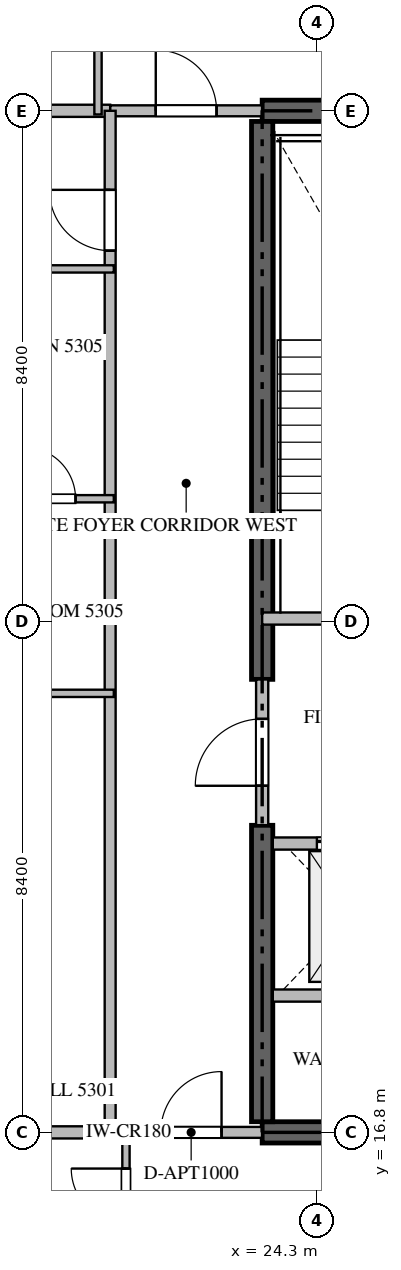
"""IFC4 building model, lengths in metres.
Left out: names, types, materials, properties, quantities, classifications, styles, units other than length and angle.
Written with IfcOpenShell. Run it as: python <this file> out.ifc"""

import sys

from ifc_helpers import new_model, si_unit, direction, frame, frame_2d, origin, place, context, subcontext, project, spatial, rectangle, extrude, source, transform, mapped, element, fill, save


model = new_model("IFC4")
c1 = context("Model", 3, precision=1e-05, world=origin(), true_north=direction((0.0, 1.0)))
c2 = subcontext(c1, "Body", "Model", "MODEL_VIEW")
j1 = project(units=[si_unit("LENGTHUNIT", "METRE"), si_unit("PLANEANGLEUNIT", "RADIAN")], contexts=[c1])
p1 = place(None, origin())
s1 = spatial("IfcSite", under=j1, at=p1, CompositionType="ELEMENT")
p2 = place(p1, origin())
s2 = spatial("IfcBuilding", under=s1, at=p2, CompositionType="ELEMENT")
p3 = place(p2, frame((0.0, 0.0, 214.3)))
s3 = spatial("IfcBuildingStorey", under=s2, at=p3, CompositionType="ELEMENT", Elevation=214.3)
for number, where, z_axis, x_axis in (
    (1, (23.4, 16.8, -0.26), (0.0, 0.0, 1.0), (1.0, 0.0, 0.0)),
    (2, (41.4, 33.6, -0.26), (0.0, 0.0, 1.0), (-1.0, 0.0, 0.0)),
):
    element("IfcWall", number, at=place(p3, frame(where, z_axis=z_axis, x_axis=x_axis)), inside=s3, PredefinedType="SHEAR", context=c2, shape_type="SweptSolid", body=[
        extrude(rectangle(XDim=18.0, YDim=0.35, at=frame_2d((9.0, 0.0))), origin(), (0.0, 0.0, 1.0), 3.848),
    ])
p4 = place(p3, frame((23.4, 16.975, -0.26), z_axis=(0.0, 0.0, 1.0), x_axis=(0.0, 1.0, 0.0)))
e3 = element("IfcWall", 3, at=p4, inside=s3, PredefinedType="SHEAR", context=c2, shape_type="SweptSolid", body=[
    extrude(rectangle(XDim=4.875, YDim=0.35, at=frame_2d((2.438, 0.0))), origin(), (0.0, 0.0, 1.0), 3.848),
])
p5 = place(p3, frame((23.4, 24.25, -0.26), z_axis=(0.0, 0.0, 1.0), x_axis=(0.0, 1.0, 0.0)))
e4 = element("IfcWall", 4, at=p5, inside=s3, PredefinedType="SHEAR", context=c2, shape_type="SweptSolid", body=[
    extrude(rectangle(XDim=9.175, YDim=0.35, at=frame_2d((4.587, 0.0))), origin(), (0.0, 0.0, 1.0), 3.848),
])
p6 = place(p3, frame((23.4, 25.25, 0.0), z_axis=(0.0, 0.0, 1.0), x_axis=(1.0, 0.0, 0.0)))
e5 = element("IfcWall", 5, at=p6, inside=s3, PredefinedType="STANDARD", context=c2, shape_type="SweptSolid", body=[
    extrude(rectangle(XDim=4.45, YDim=0.2, at=frame_2d((2.225, 0.0))), origin(), (0.0, 0.0, 1.0), 3.59),
])
p7 = place(p6, frame((1.65, 0.0, 0.0)))
e6 = element("IfcOpeningElement", 6, at=p7, cuts=e5, PredefinedType="OPENING", context=c2, shape_type="SweptSolid", body=[
    extrude(rectangle(XDim=1.1, YDim=2.15, at=frame_2d((0.55, 1.075))), frame((0.0, 0.11, 0.0), z_axis=(0.0, -1.0, 0.0), x_axis=(1.0, 0.0, 0.0)), (0.0, 0.0, 1.0), 0.22),
])
p8 = place(p3, frame((23.575, 21.55, 0.0), z_axis=(0.0, 0.0, 1.0), x_axis=(1.0, 0.0, 0.0)))
e7 = element("IfcWall", 7, at=p8, inside=s3, PredefinedType="STANDARD", context=c2, shape_type="SweptSolid", body=[
    extrude(rectangle(XDim=2.475, YDim=0.2, at=frame_2d((1.238, 0.0))), origin(), (0.0, 0.0, 1.0), 3.59),
])
p9 = place(p8, frame((0.725, 0.0, 0.0)))
e8 = element("IfcOpeningElement", 8, at=p9, cuts=e7, PredefinedType="OPENING", context=c2, shape_type="SweptSolid", body=[
    extrude(rectangle(XDim=1.2, YDim=2.2, at=frame_2d((0.6, 1.1))), frame((0.0, 0.11, 0.0), z_axis=(0.0, -1.0, 0.0), x_axis=(1.0, 0.0, 0.0)), (0.0, 0.0, 1.0), 0.22),
])
p10 = place(p3, frame((23.575, 19.05, 0.0), z_axis=(0.0, 0.0, 1.0), x_axis=(1.0, 0.0, 0.0)))
e9 = element("IfcWall", 9, at=p10, inside=s3, PredefinedType="STANDARD", context=c2, shape_type="SweptSolid", body=[
    extrude(rectangle(XDim=2.475, YDim=0.2, at=frame_2d((1.238, 0.0))), origin(), (0.0, 0.0, 1.0), 3.59),
])
p11 = place(p3, frame((23.4, 21.852, 0.0), z_axis=(0.0, 0.0, 1.0), x_axis=(0.0, 1.0, 0.0)))
e10 = element("IfcWall", 10, at=p11, inside=s3, PredefinedType="STANDARD", context=c2, shape_type="SweptSolid", body=[
    extrude(rectangle(XDim=2.396, YDim=0.2, at=frame_2d((1.198, 0.0))), origin(), (0.0, 0.0, 1.0), 3.59),
])
p12 = place(p11, frame((0.648, 0.0, 0.0)))
e11 = element("IfcOpeningElement", 11, at=p12, cuts=e10, PredefinedType="OPENING", context=c2, shape_type="SweptSolid", body=[
    extrude(rectangle(XDim=1.1, YDim=2.15, at=frame_2d((0.55, 1.075))), frame((0.0, 0.11, 0.0), z_axis=(0.0, -1.0, 0.0), x_axis=(1.0, 0.0, 0.0)), (0.0, 0.0, 1.0), 0.22),
])
for number, where, z_axis, x_axis in (
    (12, (7.482, 16.8, 0.0), (0.0, 0.0, 1.0), (1.0, 0.0, 0.0)),
    (13, (7.482, 33.6, 0.0), (0.0, 0.0, 1.0), (1.0, 0.0, 0.0)),
):
    element("IfcWall", number, at=place(p3, frame(where, z_axis=z_axis, x_axis=x_axis)), inside=s3, PredefinedType="PARTITIONING", context=c2, shape_type="SweptSolid", body=[
        extrude(rectangle(XDim=13.418, YDim=0.2, at=frame_2d((6.709, 0.0))), origin(), (0.0, 0.0, 1.0), 3.59),
    ])
p13 = place(p3, frame((20.902, 16.8, 0.0), z_axis=(0.0, 0.0, 1.0), x_axis=(1.0, 0.0, 0.0)))
e14 = element("IfcWall", 14, at=p13, inside=s3, PredefinedType="PARTITIONING", context=c2, shape_type="SweptSolid", body=[
    extrude(rectangle(XDim=2.496, YDim=0.18, at=frame_2d((1.248, 0.0))), origin(), (0.0, 0.0, 1.0), 3.59),
])
p14 = place(p13, frame((0.83, 0.0, 0.0)))
e15 = element("IfcOpeningElement", 15, at=p14, cuts=e14, PredefinedType="OPENING", context=c2, shape_type="SweptSolid", body=[
    extrude(rectangle(XDim=1.0, YDim=2.15, at=frame_2d((0.5, 1.075))), frame((0.0, 0.1, 0.0), z_axis=(0.0, -1.0, 0.0), x_axis=(1.0, 0.0, 0.0)), (0.0, 0.0, 1.0), 0.2),
])
p15 = place(p3, frame((20.902, 33.6, 0.0), z_axis=(0.0, 0.0, 1.0), x_axis=(1.0, 0.0, 0.0)))
e16 = element("IfcWall", 16, at=p15, inside=s3, PredefinedType="PARTITIONING", context=c2, shape_type="SweptSolid", body=[
    extrude(rectangle(XDim=2.496, YDim=0.18, at=frame_2d((1.248, 0.0))), origin(), (0.0, 0.0, 1.0), 3.59),
])
p16 = place(p15, frame((0.748, 0.0, 0.0)))
e17 = element("IfcOpeningElement", 17, at=p16, cuts=e16, PredefinedType="OPENING", context=c2, shape_type="SweptSolid", body=[
    extrude(rectangle(XDim=1.0, YDim=2.15, at=frame_2d((0.5, 1.075))), frame((0.0, 0.1, 0.0), z_axis=(0.0, -1.0, 0.0), x_axis=(1.0, 0.0, 0.0)), (0.0, 0.0, 1.0), 0.2),
])
p17 = place(p3, frame((20.9, 16.8, 0.0), z_axis=(0.0, 0.0, 1.0), x_axis=(0.0, 1.0, 0.0)))
e18 = element("IfcWall", 18, at=p17, inside=s3, PredefinedType="PARTITIONING", context=c2, shape_type="SweptSolid", body=[
    extrude(rectangle(XDim=16.8, YDim=0.18, at=frame_2d((8.4, 0.0))), origin(), (0.0, 0.0, 1.0), 3.59),
])
p18 = place(p17, frame((14.5, 0.0, 0.0)))
e19 = element("IfcOpeningElement", 19, at=p18, cuts=e18, PredefinedType="OPENING", context=c2, shape_type="SweptSolid", body=[
    extrude(rectangle(XDim=1.0, YDim=2.15, at=frame_2d((0.5, 1.075))), frame((0.0, 0.1, 0.0), z_axis=(0.0, -1.0, 0.0), x_axis=(1.0, 0.0, 0.0)), (0.0, 0.0, 1.0), 0.2),
])
p19 = place(p3, frame((21.16, 14.65, 0.0), z_axis=(0.0, 0.0, 1.0), x_axis=(0.0, 1.0, 0.0)))
e20 = element("IfcWall", 20, at=p19, inside=s3, PredefinedType="PARTITIONING", context=c2, shape_type="SweptSolid", body=[
    extrude(rectangle(XDim=2.21, YDim=0.12, at=frame_2d((1.105, 0.0))), origin(), (0.0, 0.0, 1.0), 3.59),
])
p20 = place(p19, frame((0.655, 0.0, 0.0)))
e21 = element("IfcOpeningElement", 21, at=p20, cuts=e20, PredefinedType="OPENING", context=c2, shape_type="SweptSolid", body=[
    extrude(rectangle(XDim=0.9, YDim=2.1, at=frame_2d((0.45, 1.05))), frame((0.0, 0.07, 0.0), z_axis=(0.0, -1.0, 0.0), x_axis=(1.0, 0.0, 0.0)), (0.0, 0.0, 1.0), 0.14),
])
for number, where, z_axis, x_axis in (
    (22, (20.7, 36.35, 0.0), (0.0, 0.0, 1.0), (0.0, -1.0, 0.0)),
    (23, (18.15, 31.0, 0.0), (0.0, 0.0, 1.0), (1.0, 0.0, 0.0)),
):
    element("IfcWall", number, at=place(p3, frame(where, z_axis=z_axis, x_axis=x_axis)), inside=s3, PredefinedType="PARTITIONING", context=c2, shape_type="SweptSolid", body=[
        extrude(rectangle(XDim=2.81, YDim=0.12, at=frame_2d((1.405, 0.0))), origin(), (0.0, 0.0, 1.0), 3.59),
    ])
p21 = place(p3, frame((18.85, 24.02, 0.0), z_axis=(0.0, 0.0, 1.0), x_axis=(1.0, 0.0, 0.0)))
e24 = element("IfcWall", 24, at=p21, inside=s3, PredefinedType="PARTITIONING", context=c2, shape_type="SweptSolid", body=[
    extrude(rectangle(XDim=2.11, YDim=0.12, at=frame_2d((1.055, 0.0))), origin(), (0.0, 0.0, 1.0), 3.59),
])
p22 = place(p3, frame((18.852, 27.22, 0.0), z_axis=(0.0, 0.0, 1.0), x_axis=(1.0, 0.0, 0.0)))
e25 = element("IfcWall", 25, at=p22, inside=s3, PredefinedType="PARTITIONING", context=c2, shape_type="SweptSolid", body=[
    extrude(rectangle(XDim=2.108, YDim=0.12, at=frame_2d((1.054, 0.0))), origin(), (0.0, 0.0, 1.0), 3.59),
])
p23 = place(p22, frame((0.629, 0.0, 0.0)))
e26 = element("IfcOpeningElement", 26, at=p23, cuts=e25, PredefinedType="OPENING", context=c2, shape_type="SweptSolid", body=[
    extrude(rectangle(XDim=0.85, YDim=2.1, at=frame_2d((0.425, 1.05))), frame((0.0, 0.07, 0.0), z_axis=(0.0, -1.0, 0.0), x_axis=(1.0, 0.0, 0.0)), (0.0, 0.0, 1.0), 0.14),
])
m1 = source(origin(), c2, "Body", "SweptSolid", [
    extrude(rectangle(XDim=1.2, YDim=2.2, at=frame_2d((0.6, 1.1))), frame((0.0, 0.025, 0.0), z_axis=(0.0, -1.0, 0.0), x_axis=(1.0, 0.0, 0.0)), (0.0, 0.0, 1.0), 0.05),
])
p24 = place(p9, origin())
e27 = element("IfcDoor", 27, at=p24, inside=s3, OperationType="DOUBLE_DOOR_SLIDING", PredefinedType="DOOR", context=c2, shape_type="MappedRepresentation", body=[
    mapped(m1, transform((0.0, 0.0, 0.0), scale=1.0)),
])
fill(e8, e27)
m2 = source(origin(), c2, "Body", "SweptSolid", [
    extrude(rectangle(XDim=1.1, YDim=2.15, at=frame_2d((0.55, 1.075))), frame((0.0, 0.025, 0.0), z_axis=(0.0, -1.0, 0.0), x_axis=(1.0, 0.0, 0.0)), (0.0, 0.0, 1.0), 0.05),
])
p25 = place(p12, origin())
e28 = element("IfcDoor", 28, at=p25, inside=s3, OperationType="SINGLE_SWING_LEFT", PredefinedType="DOOR", context=c2, shape_type="MappedRepresentation", body=[
    mapped(m2, transform((0.0, 0.0, 0.0), scale=1.0)),
])
fill(e11, e28)
m3 = source(origin(), c2, "Body", "SweptSolid", [
    extrude(rectangle(XDim=1.0, YDim=2.15, at=frame_2d((0.5, 1.075))), frame((0.0, 0.025, 0.0), z_axis=(0.0, -1.0, 0.0), x_axis=(1.0, 0.0, 0.0)), (0.0, 0.0, 1.0), 0.05),
])
p26 = place(p14, origin())
e29 = element("IfcDoor", 29, at=p26, inside=s3, OperationType="SINGLE_SWING_RIGHT", PredefinedType="DOOR", context=c2, shape_type="MappedRepresentation", body=[
    mapped(m3, transform((0.0, 0.0, 0.0), scale=1.0)),
])
fill(e15, e29)
p27 = place(p16, origin())
e30 = element("IfcDoor", 30, at=p27, inside=s3, OperationType="SINGLE_SWING_LEFT", PredefinedType="DOOR", context=c2, shape_type="MappedRepresentation", body=[
    mapped(m3, transform((0.0, 0.0, 0.0), scale=1.0)),
])
fill(e17, e30)
p28 = place(p18, origin())
e31 = element("IfcDoor", 31, at=p28, inside=s3, OperationType="SINGLE_SWING_RIGHT", PredefinedType="DOOR", context=c2, shape_type="MappedRepresentation", body=[
    mapped(m3, transform((0.0, 0.0, 0.0), scale=1.0)),
])
fill(e19, e31)
m4 = source(origin(), c2, "Body", "SweptSolid", [
    extrude(rectangle(XDim=0.9, YDim=2.1, at=frame_2d((0.45, 1.05))), frame((0.0, 0.025, 0.0), z_axis=(0.0, -1.0, 0.0), x_axis=(1.0, 0.0, 0.0)), (0.0, 0.0, 1.0), 0.05),
])
p29 = place(p20, origin())
e32 = element("IfcDoor", 32, at=p29, inside=s3, OperationType="SINGLE_SWING_RIGHT", PredefinedType="DOOR", context=c2, shape_type="MappedRepresentation", body=[
    mapped(m4, transform((0.0, 0.0, 0.0), scale=1.0)),
])
fill(e21, e32)
m5 = source(origin(), c2, "Body", "SweptSolid", [
    extrude(rectangle(XDim=0.85, YDim=2.1, at=frame_2d((0.425, 1.05))), frame((0.0, 0.025, 0.0), z_axis=(0.0, -1.0, 0.0), x_axis=(1.0, 0.0, 0.0)), (0.0, 0.0, 1.0), 0.05),
])
p30 = place(p23, origin())
e33 = element("IfcDoor", 33, at=p30, inside=s3, OperationType="SINGLE_SWING_LEFT", PredefinedType="DOOR", context=c2, shape_type="MappedRepresentation", body=[
    mapped(m5, transform((0.0, 0.0, 0.0), scale=1.0)),
])
fill(e26, e33)
save(model, sys.argv[1])
